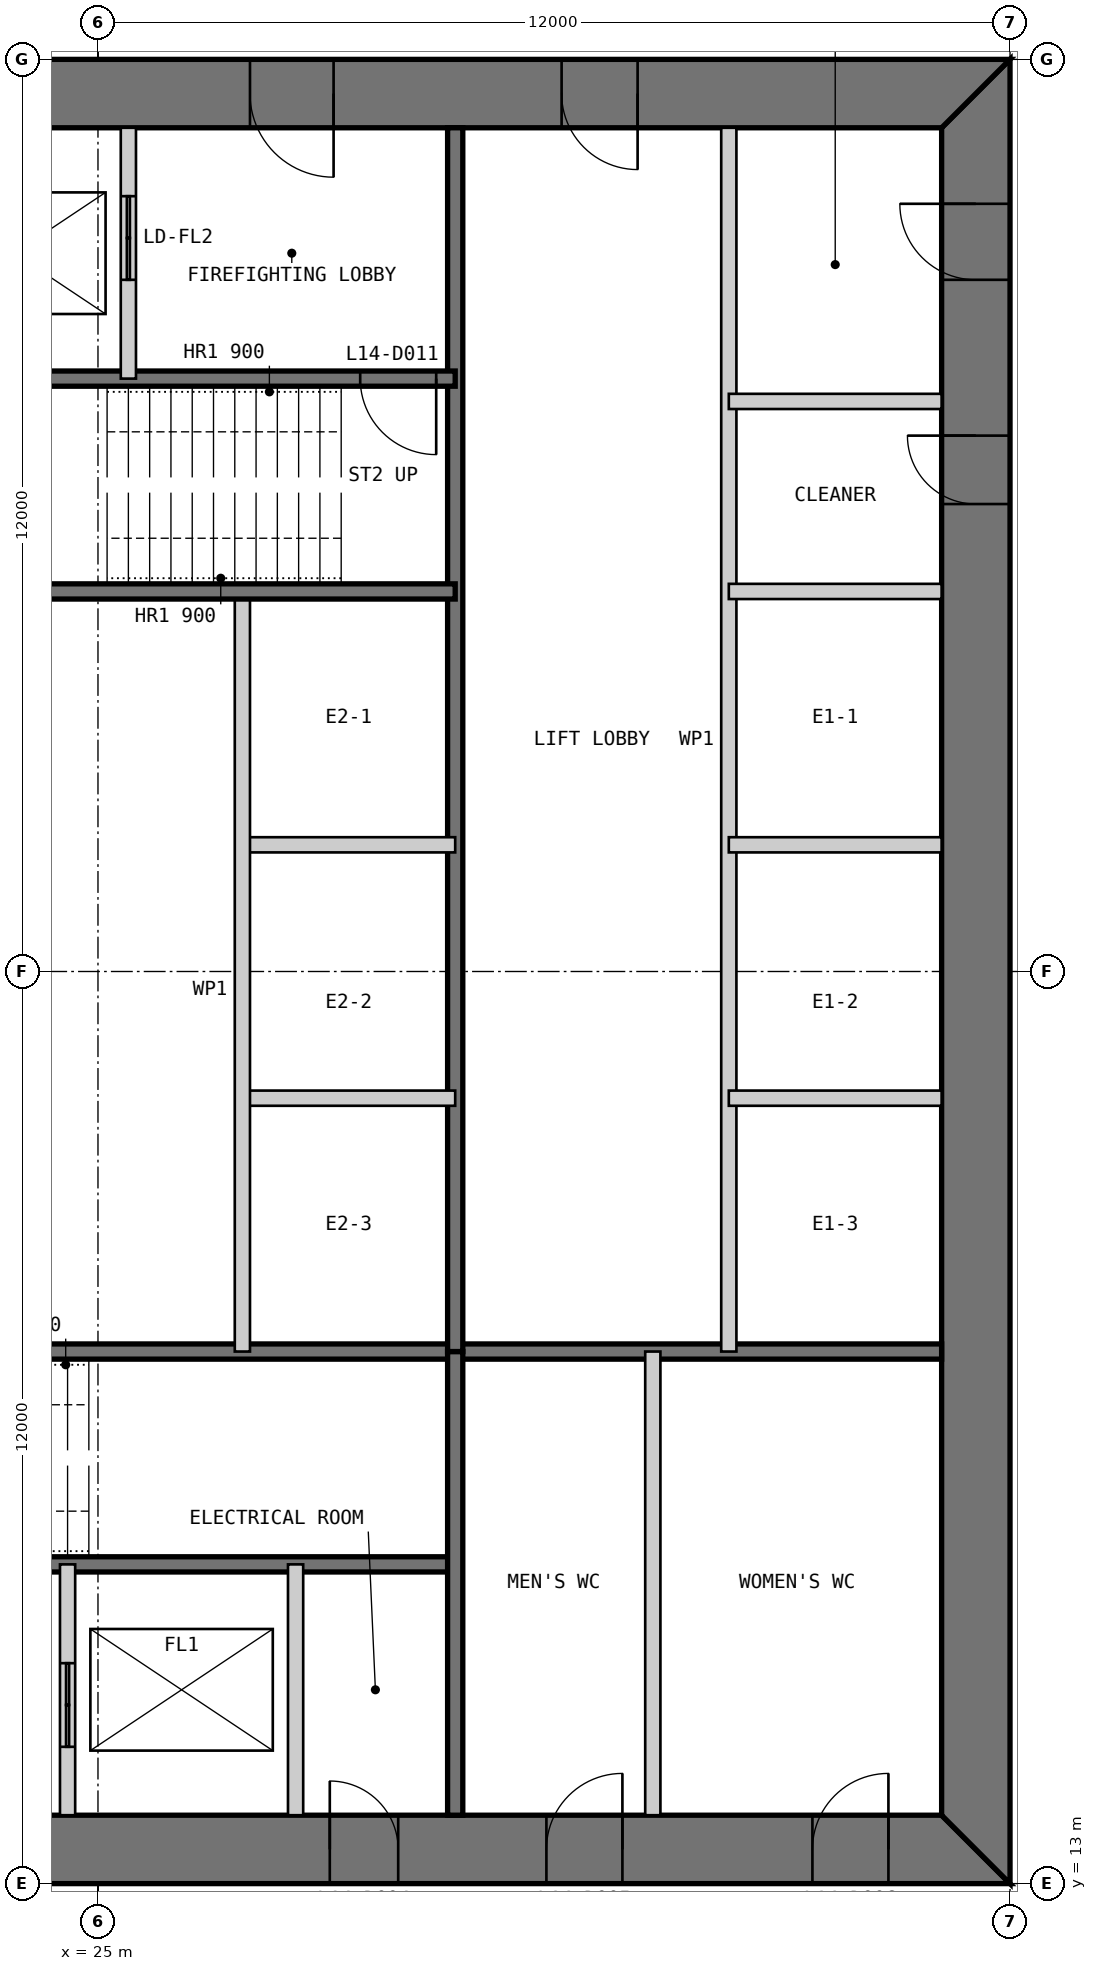
"""IFC4 building model, lengths in metres.
Left out: names, types, materials, properties, quantities, classifications, styles, units other than length and angle.
Written with IfcOpenShell. Run it as: python <this file> out.ifc"""

import sys

from ifc_helpers import new_model, si_unit, direction, frame, frame_2d, origin, place, context, subcontext, project, spatial, polyline, rectangle, outline, extrude, element, fill, save


model = new_model("IFC4")
c1 = context("Model", 3, precision=1e-05, world=origin(), true_north=direction((0.0, 1.0)))
c2 = subcontext(c1, "Body", "Model", "MODEL_VIEW")
j1 = project(units=[si_unit("LENGTHUNIT", "METRE"), si_unit("PLANEANGLEUNIT", "RADIAN")], contexts=[c1])
p1 = place(None, origin())
s1 = spatial("IfcSite", under=j1, at=p1, CompositionType="ELEMENT")
p2 = place(p1, origin())
s2 = spatial("IfcBuilding", under=s1, at=p2, CompositionType="ELEMENT")
p3 = place(p2, frame((0.0, 0.0, 63.0)))
s3 = spatial("IfcBuildingStorey", under=s2, at=p3, CompositionType="ELEMENT", Elevation=63.0)
p4 = place(p3, frame((13.0, 13.45, 0.0), z_axis=(0.0, 0.0, 1.0), x_axis=(1.0, 0.0, 0.0)))
e1 = element("IfcWall", 1, at=p4, inside=s3, PredefinedType="SHEAR", context=c2, shape_type="SweptSolid", body=[
    extrude(outline(polyline([(0.0, -0.45), (24.0, -0.45), (23.1, 0.45), (0.9, 0.45), (0.0, -0.45)])), origin(), (0.0, 0.0, 1.0), 4.0),
])
p5 = place(p4, frame((4.9, 0.0, 0.0)))
e2 = element("IfcOpeningElement", 2, at=p5, cuts=e1, PredefinedType="OPENING", context=c2, shape_type="SweptSolid", body=[
    extrude(rectangle(XDim=1.0, YDim=2.2, at=frame_2d((0.5, 1.1))), frame((0.0, 0.46, 0.0), z_axis=(0.0, -1.0, 0.0), x_axis=(1.0, 0.0, 0.0)), (0.0, 0.0, 1.0), 0.92),
])
p6 = place(p4, frame((8.9, 0.0, 0.0)))
e3 = element("IfcOpeningElement", 3, at=p6, cuts=e1, PredefinedType="OPENING", context=c2, shape_type="SweptSolid", body=[
    extrude(rectangle(XDim=1.1, YDim=2.2, at=frame_2d((0.55, 1.1))), frame((0.0, 0.46, 0.0), z_axis=(0.0, -1.0, 0.0), x_axis=(1.0, 0.0, 0.0)), (0.0, 0.0, 1.0), 0.92),
])
p7 = place(p4, frame((15.05, 0.0, 0.0)))
e4 = element("IfcOpeningElement", 4, at=p7, cuts=e1, PredefinedType="OPENING", context=c2, shape_type="SweptSolid", body=[
    extrude(rectangle(XDim=0.9, YDim=2.2, at=frame_2d((0.45, 1.1))), frame((0.0, 0.46, 0.0), z_axis=(0.0, -1.0, 0.0), x_axis=(1.0, 0.0, 0.0)), (0.0, 0.0, 1.0), 0.92),
])
p8 = place(p4, frame((17.9, 0.0, 0.0)))
e5 = element("IfcOpeningElement", 5, at=p8, cuts=e1, PredefinedType="OPENING", context=c2, shape_type="SweptSolid", body=[
    extrude(rectangle(XDim=1.0, YDim=2.2, at=frame_2d((0.5, 1.1))), frame((0.0, 0.46, 0.0), z_axis=(0.0, -1.0, 0.0), x_axis=(1.0, 0.0, 0.0)), (0.0, 0.0, 1.0), 0.92),
])
p9 = place(p4, frame((21.4, 0.0, 0.0)))
e6 = element("IfcOpeningElement", 6, at=p9, cuts=e1, PredefinedType="OPENING", context=c2, shape_type="SweptSolid", body=[
    extrude(rectangle(XDim=1.0, YDim=2.2, at=frame_2d((0.5, 1.1))), frame((0.0, 0.46, 0.0), z_axis=(0.0, -1.0, 0.0), x_axis=(1.0, 0.0, 0.0)), (0.0, 0.0, 1.0), 0.92),
])
p10 = place(p3, frame((36.55, 13.9, 0.0), z_axis=(0.0, 0.0, 1.0), x_axis=(0.0, 1.0, 0.0)))
e7 = element("IfcWall", 7, at=p10, inside=s3, PredefinedType="SHEAR", context=c2, shape_type="SweptSolid", body=[
    extrude(outline(polyline([(-0.9, -0.45), (23.1, -0.45), (22.2, 0.45), (0.0, 0.45), (-0.9, -0.45)])), origin(), (0.0, 0.0, 1.0), 4.0),
])
p11 = place(p10, frame((20.2, 0.0, 0.0)))
e8 = element("IfcOpeningElement", 8, at=p11, cuts=e7, PredefinedType="OPENING", context=c2, shape_type="SweptSolid", body=[
    extrude(rectangle(XDim=1.0, YDim=2.2, at=frame_2d((0.5, 1.1))), frame((0.0, 0.46, 0.0), z_axis=(0.0, -1.0, 0.0), x_axis=(1.0, 0.0, 0.0)), (0.0, 0.0, 1.0), 0.92),
])
p12 = place(p10, frame((17.25, 0.0, 0.0)))
e9 = element("IfcOpeningElement", 9, at=p12, cuts=e7, PredefinedType="OPENING", context=c2, shape_type="SweptSolid", body=[
    extrude(rectangle(XDim=0.9, YDim=2.2, at=frame_2d((0.45, 1.1))), frame((0.0, 0.46, 0.0), z_axis=(0.0, -1.0, 0.0), x_axis=(1.0, 0.0, 0.0)), (0.0, 0.0, 1.0), 0.92),
])
p13 = place(p3, frame((37.0, 36.55, 0.0), z_axis=(0.0, 0.0, 1.0), x_axis=(-1.0, 0.0, 0.0)))
e10 = element("IfcWall", 10, at=p13, inside=s3, PredefinedType="SHEAR", context=c2, shape_type="SweptSolid", body=[
    extrude(outline(polyline([(0.0, -0.45), (24.0, -0.45), (23.1, 0.45), (0.9, 0.45), (0.0, -0.45)])), origin(), (0.0, 0.0, 1.0), 4.0),
])
p14 = place(p13, frame((4.9, 0.0, 0.0)))
e11 = element("IfcOpeningElement", 11, at=p14, cuts=e10, PredefinedType="OPENING", context=c2, shape_type="SweptSolid", body=[
    extrude(rectangle(XDim=1.0, YDim=2.2, at=frame_2d((0.5, 1.1))), frame((0.0, 0.46, 0.0), z_axis=(0.0, -1.0, 0.0), x_axis=(1.0, 0.0, 0.0)), (0.0, 0.0, 1.0), 0.92),
])
p15 = place(p13, frame((8.9, 0.0, 0.0)))
e12 = element("IfcOpeningElement", 12, at=p15, cuts=e10, PredefinedType="OPENING", context=c2, shape_type="SweptSolid", body=[
    extrude(rectangle(XDim=1.1, YDim=2.2, at=frame_2d((0.55, 1.1))), frame((0.0, 0.46, 0.0), z_axis=(0.0, -1.0, 0.0), x_axis=(1.0, 0.0, 0.0)), (0.0, 0.0, 1.0), 0.92),
])
p16 = place(p13, frame((15.05, 0.0, 0.0)))
e13 = element("IfcOpeningElement", 13, at=p16, cuts=e10, PredefinedType="OPENING", context=c2, shape_type="SweptSolid", body=[
    extrude(rectangle(XDim=0.9, YDim=2.2, at=frame_2d((0.45, 1.1))), frame((0.0, 0.46, 0.0), z_axis=(0.0, -1.0, 0.0), x_axis=(1.0, 0.0, 0.0)), (0.0, 0.0, 1.0), 0.92),
])
p17 = place(p13, frame((17.9, 0.0, 0.0)))
e14 = element("IfcOpeningElement", 14, at=p17, cuts=e10, PredefinedType="OPENING", context=c2, shape_type="SweptSolid", body=[
    extrude(rectangle(XDim=1.0, YDim=2.2, at=frame_2d((0.5, 1.1))), frame((0.0, 0.46, 0.0), z_axis=(0.0, -1.0, 0.0), x_axis=(1.0, 0.0, 0.0)), (0.0, 0.0, 1.0), 0.92),
])
p18 = place(p13, frame((21.4, 0.0, 0.0)))
e15 = element("IfcOpeningElement", 15, at=p18, cuts=e10, PredefinedType="OPENING", context=c2, shape_type="SweptSolid", body=[
    extrude(rectangle(XDim=1.0, YDim=2.2, at=frame_2d((0.5, 1.1))), frame((0.0, 0.46, 0.0), z_axis=(0.0, -1.0, 0.0), x_axis=(1.0, 0.0, 0.0)), (0.0, 0.0, 1.0), 0.92),
])
p19 = place(p3, frame((20.3, 17.2, 0.0), z_axis=(0.0, 0.0, 1.0), x_axis=(1.0, 0.0, 0.0)))
e16 = element("IfcWall", 16, at=p19, inside=s3, PredefinedType="SOLIDWALL", context=c2, shape_type="SweptSolid", body=[
    extrude(rectangle(XDim=9.4, YDim=0.2, at=frame_2d((4.7, 0.0))), origin(), (0.0, 0.0, 1.0), 3.8),
])
p20 = place(p19, frame((0.25, 0.0, 0.0)))
e17 = element("IfcOpeningElement", 17, at=p20, cuts=e16, PredefinedType="OPENING", context=c2, shape_type="SweptSolid", body=[
    extrude(rectangle(XDim=1.0, YDim=2.2, at=frame_2d((0.5, 1.1))), frame((0.0, 0.11, 0.0), z_axis=(0.0, -1.0, 0.0), x_axis=(1.0, 0.0, 0.0)), (0.0, 0.0, 1.0), 0.22),
])
p21 = place(p3, frame((20.3, 20.0, 0.0), z_axis=(0.0, 0.0, 1.0), x_axis=(1.0, 0.0, 0.0)))
e18 = element("IfcWall", 18, at=p21, inside=s3, PredefinedType="SOLIDWALL", context=c2, shape_type="SweptSolid", body=[
    extrude(rectangle(XDim=15.8, YDim=0.2, at=frame_2d((7.9, 0.0))), origin(), (0.0, 0.0, 1.0), 3.8),
])
p22 = place(p3, frame((24.6, 13.9, 0.0), z_axis=(0.0, 0.0, 1.0), x_axis=(0.0, 1.0, 0.0)))
e19 = element("IfcWall", 19, at=p22, inside=s3, PredefinedType="PARTITIONING", context=c2, shape_type="SweptSolid", body=[
    extrude(rectangle(XDim=3.3, YDim=0.2, at=frame_2d((1.65, 0.0))), origin(), (0.0, 0.0, 1.0), 3.8),
])
p23 = place(p22, frame((0.9, 0.0, 0.0)))
e20 = element("IfcOpeningElement", 20, at=p23, cuts=e19, PredefinedType="OPENING", context=c2, shape_type="SweptSolid", body=[
    extrude(rectangle(XDim=1.1, YDim=2.2, at=frame_2d((0.55, 1.1))), frame((0.0, 0.11, 0.0), z_axis=(0.0, -1.0, 0.0), x_axis=(1.0, 0.0, 0.0)), (0.0, 0.0, 1.0), 0.22),
])
p24 = place(p3, frame((27.6, 13.9, 0.0), z_axis=(0.0, 0.0, 1.0), x_axis=(0.0, 1.0, 0.0)))
e21 = element("IfcWall", 21, at=p24, inside=s3, PredefinedType="PARTITIONING", context=c2, shape_type="SweptSolid", body=[
    extrude(rectangle(XDim=3.3, YDim=0.2, at=frame_2d((1.65, 0.0))), origin(), (0.0, 0.0, 1.0), 3.8),
])
p25 = place(p3, frame((29.7, 13.9, 0.0), z_axis=(0.0, 0.0, 1.0), x_axis=(0.0, 1.0, 0.0)))
e22 = element("IfcWall", 22, at=p25, inside=s3, PredefinedType="SOLIDWALL", context=c2, shape_type="SweptSolid", body=[
    extrude(rectangle(XDim=6.1, YDim=0.2, at=frame_2d((3.05, 0.0))), origin(), (0.0, 0.0, 1.0), 3.8),
])
p26 = place(p3, frame((32.3, 13.9, 0.0), z_axis=(0.0, 0.0, 1.0), x_axis=(0.0, 1.0, 0.0)))
e23 = element("IfcWall", 23, at=p26, inside=s3, PredefinedType="PARTITIONING", context=c2, shape_type="SweptSolid", body=[
    extrude(rectangle(XDim=6.1, YDim=0.2, at=frame_2d((3.05, 0.0))), origin(), (0.0, 0.0, 1.0), 3.8),
])
p27 = place(p3, frame((33.3, 36.1, 0.0), z_axis=(0.0, 0.0, 1.0), x_axis=(0.0, -1.0, 0.0)))
e24 = element("IfcWall", 24, at=p27, inside=s3, PredefinedType="PARTITIONING", context=c2, shape_type="SweptSolid", body=[
    extrude(rectangle(XDim=16.1, YDim=0.2, at=frame_2d((8.05, 0.0))), origin(), (0.0, 0.0, 1.0), 3.8),
])
p28 = place(p3, frame((29.7, 36.1, 0.0), z_axis=(0.0, 0.0, 1.0), x_axis=(0.0, -1.0, 0.0)))
e25 = element("IfcWall", 25, at=p28, inside=s3, PredefinedType="SOLIDWALL", context=c2, shape_type="SweptSolid", body=[
    extrude(rectangle(XDim=16.1, YDim=0.2, at=frame_2d((8.05, 0.0))), origin(), (0.0, 0.0, 1.0), 3.8),
])
for number, where, z_axis, x_axis in (
    (26, (36.1, 30.0, 0.0), (0.0, 0.0, 1.0), (-1.0, 0.0, 0.0)),
    (27, (36.1, 26.667, 0.0), (0.0, 0.0, 1.0), (-1.0, 0.0, 0.0)),
    (28, (36.1, 23.333, 0.0), (0.0, 0.0, 1.0), (-1.0, 0.0, 0.0)),
    (29, (29.7, 26.667, 0.0), (0.0, 0.0, 1.0), (-1.0, 0.0, 0.0)),
    (30, (29.7, 23.333, 0.0), (0.0, 0.0, 1.0), (-1.0, 0.0, 0.0)),
):
    element("IfcWall", number, at=place(p3, frame(where, z_axis=z_axis, x_axis=x_axis)), inside=s3, PredefinedType="PARTITIONING", context=c2, shape_type="SweptSolid", body=[
        extrude(rectangle(XDim=2.8, YDim=0.2, at=frame_2d((1.4, 0.0))), origin(), (0.0, 0.0, 1.0), 3.8),
    ])
p29 = place(p3, frame((26.9, 30.0, 0.0), z_axis=(0.0, 0.0, 1.0), x_axis=(0.0, -1.0, 0.0)))
e31 = element("IfcWall", 31, at=p29, inside=s3, PredefinedType="PARTITIONING", context=c2, shape_type="SweptSolid", body=[
    extrude(rectangle(XDim=10.0, YDim=0.2, at=frame_2d((5.0, 0.0))), origin(), (0.0, 0.0, 1.0), 3.8),
])
p30 = place(p3, frame((29.7, 32.8, 0.0), z_axis=(0.0, 0.0, 1.0), x_axis=(-1.0, 0.0, 0.0)))
e32 = element("IfcWall", 32, at=p30, inside=s3, PredefinedType="SOLIDWALL", context=c2, shape_type="SweptSolid", body=[
    extrude(rectangle(XDim=9.4, YDim=0.2, at=frame_2d((4.7, 0.0))), origin(), (0.0, 0.0, 1.0), 3.8),
])
p31 = place(p30, frame((0.25, 0.0, 0.0)))
e33 = element("IfcOpeningElement", 33, at=p31, cuts=e32, PredefinedType="OPENING", context=c2, shape_type="SweptSolid", body=[
    extrude(rectangle(XDim=1.0, YDim=2.2, at=frame_2d((0.5, 1.1))), frame((0.0, 0.11, 0.0), z_axis=(0.0, -1.0, 0.0), x_axis=(1.0, 0.0, 0.0)), (0.0, 0.0, 1.0), 0.22),
])
p32 = place(p3, frame((29.7, 30.0, 0.0), z_axis=(0.0, 0.0, 1.0), x_axis=(-1.0, 0.0, 0.0)))
e34 = element("IfcWall", 34, at=p32, inside=s3, PredefinedType="SOLIDWALL", context=c2, shape_type="SweptSolid", body=[
    extrude(rectangle(XDim=15.8, YDim=0.2, at=frame_2d((7.9, 0.0))), origin(), (0.0, 0.0, 1.0), 3.8),
])
p33 = place(p3, frame((25.4, 36.1, 0.0), z_axis=(0.0, 0.0, 1.0), x_axis=(0.0, -1.0, 0.0)))
e35 = element("IfcWall", 35, at=p33, inside=s3, PredefinedType="PARTITIONING", context=c2, shape_type="SweptSolid", body=[
    extrude(rectangle(XDim=3.3, YDim=0.2, at=frame_2d((1.65, 0.0))), origin(), (0.0, 0.0, 1.0), 3.8),
])
p34 = place(p33, frame((0.9, 0.0, 0.0)))
e36 = element("IfcOpeningElement", 36, at=p34, cuts=e35, PredefinedType="OPENING", context=c2, shape_type="SweptSolid", body=[
    extrude(rectangle(XDim=1.1, YDim=2.2, at=frame_2d((0.55, 1.1))), frame((0.0, 0.11, 0.0), z_axis=(0.0, -1.0, 0.0), x_axis=(1.0, 0.0, 0.0)), (0.0, 0.0, 1.0), 0.22),
])
p35 = place(p3, frame((36.1, 32.5, 0.0), z_axis=(0.0, 0.0, 1.0), x_axis=(-1.0, 0.0, 0.0)))
e37 = element("IfcWall", 37, at=p35, inside=s3, PredefinedType="PARTITIONING", context=c2, shape_type="SweptSolid", body=[
    extrude(rectangle(XDim=2.8, YDim=0.2, at=frame_2d((1.4, 0.0))), origin(), (0.0, 0.0, 1.0), 3.8),
])
p36 = place(p7, origin())
e38 = element("IfcDoor", 38, at=p36, inside=s3, OperationType="SINGLE_SWING_LEFT", PredefinedType="DOOR", context=c2, shape_type="SweptSolid", body=[
    extrude(rectangle(XDim=0.9, YDim=2.2, at=frame_2d((0.45, 1.1))), frame((0.0, 0.025, 0.0), z_axis=(0.0, -1.0, 0.0), x_axis=(1.0, 0.0, 0.0)), (0.0, 0.0, 1.0), 0.05),
    extrude(outline(polyline([(0.0, 0.0), (0.04, 0.0), (0.04, 2.16), (0.86, 2.16), (0.86, 0.0), (0.9, 0.0), (0.9, 2.2), (0.0, 2.2), (0.0, 0.0)])), frame((0.0, 0.3, 0.0), z_axis=(0.0, -1.0, 0.0), x_axis=(1.0, 0.0, 0.0)), (0.0, 0.0, 1.0), 0.6),
])
fill(e4, e38)
p37 = place(p8, origin())
e39 = element("IfcDoor", 39, at=p37, inside=s3, OperationType="SINGLE_SWING_RIGHT", PredefinedType="DOOR", context=c2, shape_type="SweptSolid", body=[
    extrude(rectangle(XDim=1.0, YDim=2.2, at=frame_2d((0.5, 1.1))), frame((0.0, 0.025, 0.0), z_axis=(0.0, -1.0, 0.0), x_axis=(1.0, 0.0, 0.0)), (0.0, 0.0, 1.0), 0.05),
    extrude(outline(polyline([(0.0, 0.0), (0.04, 0.0), (0.04, 2.16), (0.96, 2.16), (0.96, 0.0), (1.0, 0.0), (1.0, 2.2), (0.0, 2.2), (0.0, 0.0)])), frame((0.0, 0.3, 0.0), z_axis=(0.0, -1.0, 0.0), x_axis=(1.0, 0.0, 0.0)), (0.0, 0.0, 1.0), 0.6),
])
fill(e5, e39)
p38 = place(p9, origin())
e40 = element("IfcDoor", 40, at=p38, inside=s3, OperationType="SINGLE_SWING_RIGHT", PredefinedType="DOOR", context=c2, shape_type="SweptSolid", body=[
    extrude(rectangle(XDim=1.0, YDim=2.2, at=frame_2d((0.5, 1.1))), frame((0.0, 0.025, 0.0), z_axis=(0.0, -1.0, 0.0), x_axis=(1.0, 0.0, 0.0)), (0.0, 0.0, 1.0), 0.05),
    extrude(outline(polyline([(0.0, 0.0), (0.04, 0.0), (0.04, 2.16), (0.96, 2.16), (0.96, 0.0), (1.0, 0.0), (1.0, 2.2), (0.0, 2.2), (0.0, 0.0)])), frame((0.0, 0.3, 0.0), z_axis=(0.0, -1.0, 0.0), x_axis=(1.0, 0.0, 0.0)), (0.0, 0.0, 1.0), 0.6),
])
fill(e6, e40)
p39 = place(p14, origin())
e41 = element("IfcDoor", 41, at=p39, inside=s3, OperationType="SINGLE_SWING_LEFT", PredefinedType="DOOR", context=c2, shape_type="SweptSolid", body=[
    extrude(rectangle(XDim=1.0, YDim=2.2, at=frame_2d((0.5, 1.1))), frame((0.0, 0.025, 0.0), z_axis=(0.0, -1.0, 0.0), x_axis=(1.0, 0.0, 0.0)), (0.0, 0.0, 1.0), 0.05),
    extrude(outline(polyline([(0.0, 0.0), (0.04, 0.0), (0.04, 2.16), (0.96, 2.16), (0.96, 0.0), (1.0, 0.0), (1.0, 2.2), (0.0, 2.2), (0.0, 0.0)])), frame((0.0, 0.3, 0.0), z_axis=(0.0, -1.0, 0.0), x_axis=(1.0, 0.0, 0.0)), (0.0, 0.0, 1.0), 0.6),
])
fill(e11, e41)
p40 = place(p15, origin())
e42 = element("IfcDoor", 42, at=p40, inside=s3, OperationType="SINGLE_SWING_LEFT", PredefinedType="DOOR", context=c2, shape_type="SweptSolid", body=[
    extrude(rectangle(XDim=1.1, YDim=2.2, at=frame_2d((0.55, 1.1))), frame((0.0, 0.025, 0.0), z_axis=(0.0, -1.0, 0.0), x_axis=(1.0, 0.0, 0.0)), (0.0, 0.0, 1.0), 0.05),
    extrude(outline(polyline([(0.0, 0.0), (0.04, 0.0), (0.04, 2.16), (1.06, 2.16), (1.06, 0.0), (1.1, 0.0), (1.1, 2.2), (0.0, 2.2), (0.0, 0.0)])), frame((0.0, 0.3, 0.0), z_axis=(0.0, -1.0, 0.0), x_axis=(1.0, 0.0, 0.0)), (0.0, 0.0, 1.0), 0.6),
])
fill(e12, e42)
p41 = place(p31, origin())
e43 = element("IfcDoor", 43, at=p41, inside=s3, OperationType="SINGLE_SWING_LEFT", PredefinedType="DOOR", context=c2, shape_type="SweptSolid", body=[
    extrude(rectangle(XDim=1.0, YDim=2.2, at=frame_2d((0.5, 1.1))), frame((0.0, 0.025, 0.0), z_axis=(0.0, -1.0, 0.0), x_axis=(1.0, 0.0, 0.0)), (0.0, 0.0, 1.0), 0.05),
])
fill(e33, e43)
p42 = place(p11, origin())
e44 = element("IfcDoor", 44, at=p42, inside=s3, OperationType="SINGLE_SWING_RIGHT", PredefinedType="DOOR", context=c2, shape_type="SweptSolid", body=[
    extrude(rectangle(XDim=1.0, YDim=2.2, at=frame_2d((0.5, 1.1))), frame((0.0, 0.025, 0.0), z_axis=(0.0, -1.0, 0.0), x_axis=(1.0, 0.0, 0.0)), (0.0, 0.0, 1.0), 0.05),
    extrude(outline(polyline([(0.0, 0.0), (0.04, 0.0), (0.04, 2.16), (0.96, 2.16), (0.96, 0.0), (1.0, 0.0), (1.0, 2.2), (0.0, 2.2), (0.0, 0.0)])), frame((0.0, 0.3, 0.0), z_axis=(0.0, -1.0, 0.0), x_axis=(1.0, 0.0, 0.0)), (0.0, 0.0, 1.0), 0.6),
])
fill(e8, e44)
p43 = place(p12, origin())
e45 = element("IfcDoor", 45, at=p43, inside=s3, OperationType="SINGLE_SWING_RIGHT", PredefinedType="DOOR", context=c2, shape_type="SweptSolid", body=[
    extrude(rectangle(XDim=0.9, YDim=2.2, at=frame_2d((0.45, 1.1))), frame((0.0, 0.025, 0.0), z_axis=(0.0, -1.0, 0.0), x_axis=(1.0, 0.0, 0.0)), (0.0, 0.0, 1.0), 0.05),
    extrude(outline(polyline([(0.0, 0.0), (0.04, 0.0), (0.04, 2.16), (0.86, 2.16), (0.86, 0.0), (0.9, 0.0), (0.9, 2.2), (0.0, 2.2), (0.0, 0.0)])), frame((0.0, 0.3, 0.0), z_axis=(0.0, -1.0, 0.0), x_axis=(1.0, 0.0, 0.0)), (0.0, 0.0, 1.0), 0.6),
])
fill(e9, e45)
p44 = place(p23, origin())
e46 = element("IfcDoor", 46, at=p44, inside=s3, OperationType="DOUBLE_DOOR_SLIDING", PredefinedType="DOOR", context=c2, shape_type="SweptSolid", body=[
    extrude(rectangle(XDim=1.1, YDim=2.2, at=frame_2d((0.55, 1.1))), frame((0.0, 0.025, 0.0), z_axis=(0.0, -1.0, 0.0), x_axis=(1.0, 0.0, 0.0)), (0.0, 0.0, 1.0), 0.05),
])
fill(e20, e46)
p45 = place(p34, origin())
e47 = element("IfcDoor", 47, at=p45, inside=s3, OperationType="DOUBLE_DOOR_SLIDING", PredefinedType="DOOR", context=c2, shape_type="SweptSolid", body=[
    extrude(rectangle(XDim=1.1, YDim=2.2, at=frame_2d((0.55, 1.1))), frame((0.0, 0.025, 0.0), z_axis=(0.0, -1.0, 0.0), x_axis=(1.0, 0.0, 0.0)), (0.0, 0.0, 1.0), 0.05),
])
fill(e36, e47)
save(model, sys.argv[1])
